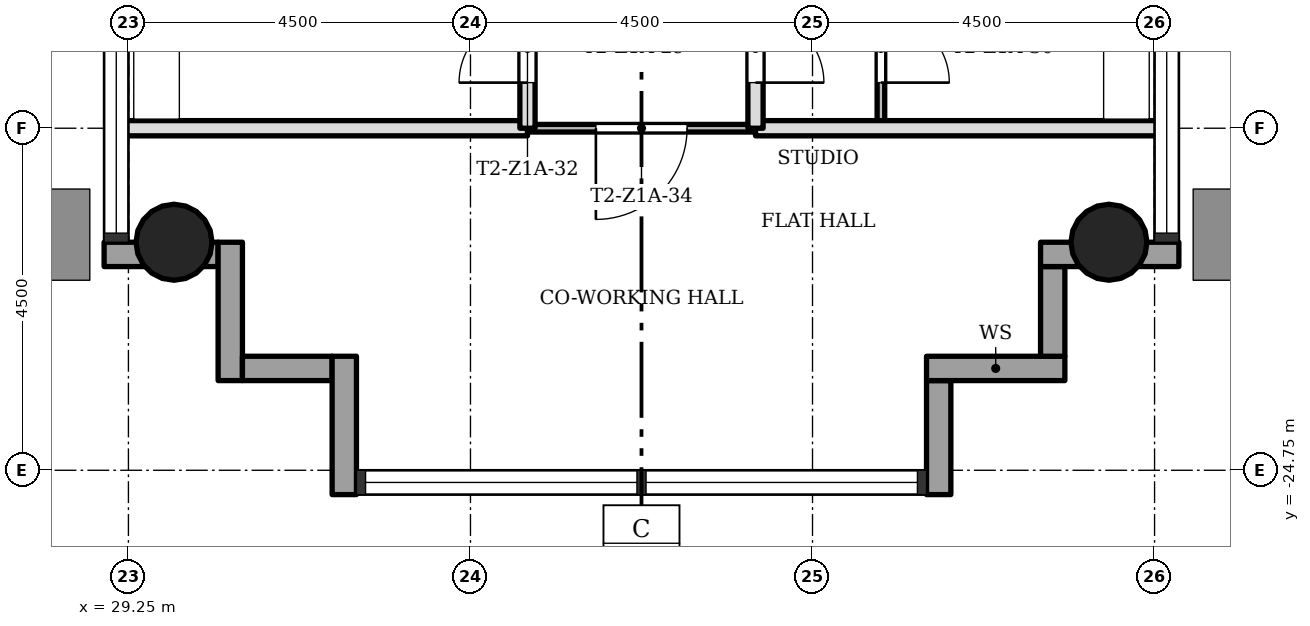
"""IFC4 building model, lengths in metres.
Left out: names, types, materials, properties, quantities, classifications, styles, units other than length and angle.
Written with IfcOpenShell. Run it as: python <this file> out.ifc"""

import sys

from ifc_helpers import new_model, si_unit, direction, frame, frame_2d, origin, origin_2d, place, context, subcontext, project, spatial, rectangle, hollow_circle, extrude, element, fill, save


model = new_model("IFC4")
c1 = context("Model", 3, precision=1e-05, world=origin(), true_north=direction((0.0, 1.0)))
c2 = subcontext(c1, "Body", "Model", "MODEL_VIEW")
j1 = project(units=[si_unit("LENGTHUNIT", "METRE"), si_unit("PLANEANGLEUNIT", "RADIAN")], contexts=[c1])
p1 = place(None, origin())
s1 = spatial("IfcSite", under=j1, at=p1, CompositionType="ELEMENT")
p2 = place(p1, origin())
s2 = spatial("IfcBuilding", under=s1, at=p2, CompositionType="ELEMENT")
p3 = place(p2, frame((0.0, 0.0, 31.3)))
s3 = spatial("IfcBuildingStorey", under=s2, at=p3, CompositionType="ELEMENT", Elevation=31.3)
for number, where, z_axis, x_axis in (
    (1, (42.15, -21.75, 0.0), (0.0, 0.0, 1.0), (1.0, 0.0, 0.0)),
    (2, (29.85, -21.75, 0.0), (0.0, 0.0, 1.0), (1.0, 0.0, 0.0)),
):
    element("IfcColumn", number, at=place(p3, frame(where, z_axis=z_axis, x_axis=x_axis)), inside=s3, PredefinedType="COLUMN", context=c2, shape_type="SweptSolid", body=[
        extrude(hollow_circle(Radius=0.5, WallThickness=0.036, at=origin_2d()), origin(), (0.0, 0.0, 1.0), 3.4),
    ])
p4 = place(p3, frame((39.91, -25.07, -0.3), z_axis=(0.0, 0.0, 1.0), x_axis=(0.0, 1.0, 0.0)))
e3 = element("IfcWall", 3, at=p4, inside=s3, PredefinedType="STANDARD", context=c2, shape_type="SweptSolid", body=[
    extrude(rectangle(XDim=1.5, YDim=0.32, at=frame_2d((0.75, 0.0))), origin(), (0.0, 0.0, 1.0), 3.4),
])
p5 = place(p3, frame((39.75, -23.41, -0.3), z_axis=(0.0, 0.0, 1.0), x_axis=(1.0, 0.0, 0.0)))
e4 = element("IfcWall", 4, at=p5, inside=s3, PredefinedType="STANDARD", context=c2, shape_type="SweptSolid", body=[
    extrude(rectangle(XDim=1.82, YDim=0.32, at=frame_2d((0.91, 0.0))), origin(), (0.0, 0.0, 1.0), 3.4),
])
p6 = place(p3, frame((41.41, -23.25, -0.3), z_axis=(0.0, 0.0, 1.0), x_axis=(0.0, 1.0, 0.0)))
e5 = element("IfcWall", 5, at=p6, inside=s3, PredefinedType="STANDARD", context=c2, shape_type="SweptSolid", body=[
    extrude(rectangle(XDim=1.18, YDim=0.32, at=frame_2d((0.59, 0.0))), origin(), (0.0, 0.0, 1.0), 3.4),
])
p7 = place(p3, frame((41.25, -21.91, -0.3), z_axis=(0.0, 0.0, 1.0), x_axis=(1.0, 0.0, 0.0)))
e6 = element("IfcWall", 6, at=p7, inside=s3, PredefinedType="STANDARD", context=c2, shape_type="SweptSolid", body=[
    extrude(rectangle(XDim=1.82, YDim=0.32, at=frame_2d((0.91, 0.0))), origin(), (0.0, 0.0, 1.0), 3.4),
])
p8 = place(p3, frame((28.93, -21.91, -0.3), z_axis=(0.0, 0.0, 1.0), x_axis=(1.0, 0.0, 0.0)))
e7 = element("IfcWall", 7, at=p8, inside=s3, PredefinedType="STANDARD", context=c2, shape_type="SweptSolid", body=[
    extrude(rectangle(XDim=1.5, YDim=0.32, at=frame_2d((0.75, 0.0))), origin(), (0.0, 0.0, 1.0), 3.4),
])
p9 = place(p3, frame((30.59, -21.75, -0.3), z_axis=(0.0, 0.0, 1.0), x_axis=(0.0, -1.0, 0.0)))
e8 = element("IfcWall", 8, at=p9, inside=s3, PredefinedType="STANDARD", context=c2, shape_type="SweptSolid", body=[
    extrude(rectangle(XDim=1.82, YDim=0.32, at=frame_2d((0.91, 0.0))), origin(), (0.0, 0.0, 1.0), 3.4),
])
p10 = place(p3, frame((30.75, -23.41, -0.3), z_axis=(0.0, 0.0, 1.0), x_axis=(1.0, 0.0, 0.0)))
e9 = element("IfcWall", 9, at=p10, inside=s3, PredefinedType="STANDARD", context=c2, shape_type="SweptSolid", body=[
    extrude(rectangle(XDim=1.18, YDim=0.32, at=frame_2d((0.59, 0.0))), origin(), (0.0, 0.0, 1.0), 3.4),
])
p11 = place(p3, frame((32.09, -23.25, -0.3), z_axis=(0.0, 0.0, 1.0), x_axis=(0.0, -1.0, 0.0)))
e10 = element("IfcWall", 10, at=p11, inside=s3, PredefinedType="STANDARD", context=c2, shape_type="SweptSolid", body=[
    extrude(rectangle(XDim=1.82, YDim=0.32, at=frame_2d((0.91, 0.0))), origin(), (0.0, 0.0, 1.0), 3.4),
])
p12 = place(p3, frame((37.5, -20.25, 0.0), z_axis=(0.0, 0.0, 1.0), x_axis=(-1.0, 0.0, 0.0)))
e11 = element("IfcWall", 11, at=p12, inside=s3, PredefinedType="PARTITIONING", context=c2, shape_type="SweptSolid", body=[
    extrude(rectangle(XDim=3.0, YDim=0.1, at=frame_2d((1.5, 0.0))), origin(), (0.0, 0.0, 1.0), 3.0),
])
p13 = place(p12, frame((0.9, 0.0, 0.0)))
e12 = element("IfcOpeningElement", 12, at=p13, cuts=e11, PredefinedType="OPENING", context=c2, shape_type="SweptSolid", body=[
    extrude(rectangle(XDim=1.2, YDim=2.1, at=frame_2d((0.6, 1.05))), frame((0.0, 0.06, 0.0), z_axis=(0.0, -1.0, 0.0), x_axis=(1.0, 0.0, 0.0)), (0.0, 0.0, 1.0), 0.12),
])
for number, where, z_axis, x_axis in (
    (13, (42.85, -20.25, 0.0), (0.0, 0.0, 1.0), (-1.0, 0.0, 0.0)),
    (14, (34.5, -20.25, 0.0), (0.0, 0.0, 1.0), (-1.0, 0.0, 0.0)),
):
    element("IfcWall", number, at=place(p3, frame(where, z_axis=z_axis, x_axis=x_axis)), inside=s3, PredefinedType="SOLIDWALL", context=c2, shape_type="SweptSolid", body=[
        extrude(rectangle(XDim=5.35, YDim=0.2, at=frame_2d((2.675, 0.0))), origin(), (0.0, 0.0, 1.0), 3.0),
    ])
p14 = place(p3, frame((39.15, -20.25, 0.0), z_axis=(0.0, 0.0, 1.0), x_axis=(0.0, 1.0, 0.0)))
e15 = element("IfcWall", 15, at=p14, inside=s3, PredefinedType="PARTITIONING", context=c2, shape_type="SweptSolid", body=[
    extrude(rectangle(XDim=4.5, YDim=0.1, at=frame_2d((2.25, 0.0))), origin(), (0.0, 0.0, 1.0), 3.0),
])
p15 = place(p14, frame((0.6, 0.0, 0.0)))
e16 = element("IfcOpeningElement", 16, at=p15, cuts=e15, PredefinedType="OPENING", context=c2, shape_type="SweptSolid", body=[
    extrude(rectangle(XDim=0.9, YDim=2.1, at=frame_2d((0.45, 1.05))), frame((0.0, 0.06, 0.0), z_axis=(0.0, -1.0, 0.0), x_axis=(1.0, 0.0, 0.0)), (0.0, 0.0, 1.0), 0.12),
])
p16 = place(p3, frame((37.5, -20.25, 0.0), z_axis=(0.0, 0.0, 1.0), x_axis=(0.0, 1.0, 0.0)))
e17 = element("IfcWall", 17, at=p16, inside=s3, PredefinedType="SOLIDWALL", context=c2, shape_type="SweptSolid", body=[
    extrude(rectangle(XDim=4.5, YDim=0.2, at=frame_2d((2.25, 0.0))), origin(), (0.0, 0.0, 1.0), 3.0),
])
p17 = place(p16, frame((0.6, 0.0, 0.0)))
e18 = element("IfcOpeningElement", 18, at=p17, cuts=e17, PredefinedType="OPENING", context=c2, shape_type="SweptSolid", body=[
    extrude(rectangle(XDim=0.9, YDim=2.1, at=frame_2d((0.45, 1.05))), frame((0.0, 0.11, 0.0), z_axis=(0.0, -1.0, 0.0), x_axis=(1.0, 0.0, 0.0)), (0.0, 0.0, 1.0), 0.22),
])
p18 = place(p3, frame((34.5, -20.25, 0.0), z_axis=(0.0, 0.0, 1.0), x_axis=(0.0, 1.0, 0.0)))
e19 = element("IfcWall", 19, at=p18, inside=s3, PredefinedType="SOLIDWALL", context=c2, shape_type="SweptSolid", body=[
    extrude(rectangle(XDim=4.5, YDim=0.2, at=frame_2d((2.25, 0.0))), origin(), (0.0, 0.0, 1.0), 3.0),
])
p19 = place(p18, frame((0.6, 0.0, 0.0)))
e20 = element("IfcOpeningElement", 20, at=p19, cuts=e19, PredefinedType="OPENING", context=c2, shape_type="SweptSolid", body=[
    extrude(rectangle(XDim=0.9, YDim=2.1, at=frame_2d((0.45, 1.05))), frame((0.0, 0.11, 0.0), z_axis=(0.0, -1.0, 0.0), x_axis=(1.0, 0.0, 0.0)), (0.0, 0.0, 1.0), 0.22),
])
p20 = place(p17, origin())
e21 = element("IfcDoor", 21, at=p20, inside=s3, OperationType="SINGLE_SWING_LEFT", PredefinedType="DOOR", context=c2, shape_type="SweptSolid", body=[
    extrude(rectangle(XDim=0.9, YDim=2.1, at=frame_2d((0.45, 1.05))), frame((0.0, 0.025, 0.0), z_axis=(0.0, -1.0, 0.0), x_axis=(1.0, 0.0, 0.0)), (0.0, 0.0, 1.0), 0.05),
])
fill(e18, e21)
p21 = place(p15, origin())
e22 = element("IfcDoor", 22, at=p21, inside=s3, OperationType="SINGLE_SWING_LEFT", PredefinedType="DOOR", context=c2, shape_type="SweptSolid", body=[
    extrude(rectangle(XDim=0.9, YDim=2.1, at=frame_2d((0.45, 1.05))), frame((0.0, 0.025, 0.0), z_axis=(0.0, -1.0, 0.0), x_axis=(1.0, 0.0, 0.0)), (0.0, 0.0, 1.0), 0.05),
])
fill(e16, e22)
p22 = place(p19, origin())
e23 = element("IfcDoor", 23, at=p22, inside=s3, OperationType="SINGLE_SWING_RIGHT", PredefinedType="DOOR", context=c2, shape_type="SweptSolid", body=[
    extrude(rectangle(XDim=0.9, YDim=2.1, at=frame_2d((0.45, 1.05))), frame((0.0, 0.025, 0.0), z_axis=(0.0, -1.0, 0.0), x_axis=(1.0, 0.0, 0.0)), (0.0, 0.0, 1.0), 0.05),
])
fill(e20, e23)
p23 = place(p13, origin())
e24 = element("IfcDoor", 24, at=p23, inside=s3, OperationType="SINGLE_SWING_LEFT", PredefinedType="DOOR", context=c2, shape_type="SweptSolid", body=[
    extrude(rectangle(XDim=1.2, YDim=2.1, at=frame_2d((0.6, 1.05))), frame((0.0, 0.025, 0.0), z_axis=(0.0, -1.0, 0.0), x_axis=(1.0, 0.0, 0.0)), (0.0, 0.0, 1.0), 0.05),
])
fill(e12, e24)
save(model, sys.argv[1])
